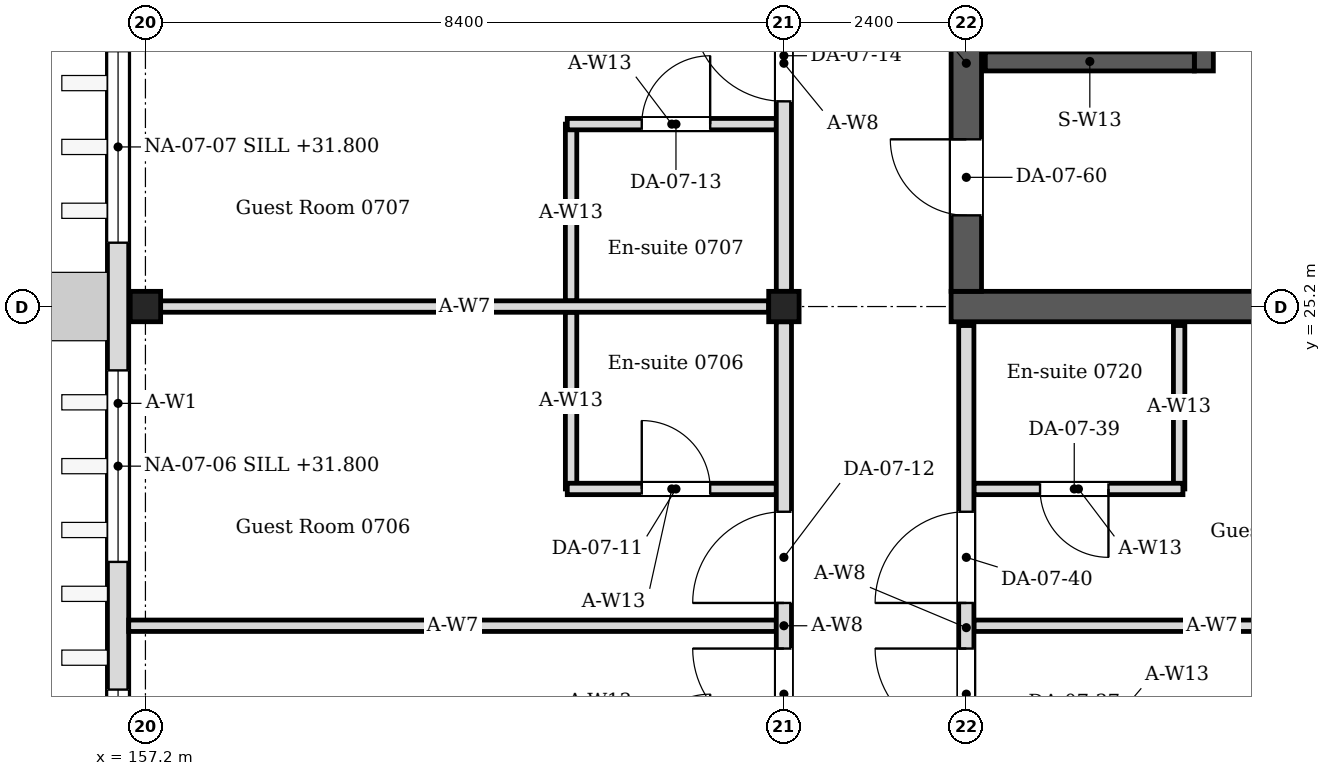
"""IFC4 building model, lengths in metres.
Left out: names, types, materials, properties, quantities, classifications, styles, units other than length and angle.
Written with IfcOpenShell. Run it as: python <this file> out.ifc"""

import sys

from ifc_helpers import new_model, si_unit, direction, frame, frame_2d, origin, origin_2d, place, context, subcontext, project, spatial, rectangle, i_section, extrude, element, fill, save


model = new_model("IFC4")
c1 = context("Model", 3, precision=1e-05, world=origin(), true_north=direction((0.0, 1.0)))
c2 = subcontext(c1, "Body", "Model", "MODEL_VIEW")
j1 = project(units=[si_unit("LENGTHUNIT", "METRE"), si_unit("PLANEANGLEUNIT", "RADIAN")], contexts=[c1])
p1 = place(None, origin())
s1 = spatial("IfcSite", under=j1, at=p1, CompositionType="ELEMENT")
p2 = place(p1, origin())
s2 = spatial("IfcBuilding", under=s1, at=p2, CompositionType="ELEMENT")
p3 = place(p2, frame((0.0, 0.0, 31.2)))
s3 = spatial("IfcBuildingStorey", under=s2, at=p3, CompositionType="ELEMENT", Elevation=31.2)
for number, where, z_axis, x_axis in (
    (1, (157.2, 25.2, 0.0), (0.0, 0.0, 1.0), (1.0, 0.0, 0.0)),
    (2, (165.6, 25.2, 0.0), (0.0, 0.0, 1.0), (1.0, 0.0, 0.0)),
):
    element("IfcColumn", number, at=place(p3, frame(where, z_axis=z_axis, x_axis=x_axis)), inside=s3, PredefinedType="COLUMN", context=c2, shape_type="SweptSolid", body=[
        extrude(i_section(OverallWidth=0.4, OverallDepth=0.4, WebThickness=0.013, FlangeThickness=0.021, FilletRadius=0.022, at=origin_2d()), origin(), (0.0, 0.0, 1.0), 4.2),
    ])
p4 = place(p3, frame((167.8, 25.2, 0.0), z_axis=(0.0, 0.0, 1.0), x_axis=(1.0, 0.0, 0.0)))
e3 = element("IfcWall", 3, at=p4, inside=s3, PredefinedType="SOLIDWALL", context=c2, shape_type="SweptSolid", body=[
    extrude(rectangle(XDim=8.8, YDim=0.4, at=frame_2d((4.4, 0.0))), origin(), (0.0, 0.0, 1.0), 4.05),
])
p5 = place(p3, frame((168.0, 25.4, 0.0), z_axis=(0.0, 0.0, 1.0), x_axis=(0.0, 1.0, 0.0)))
e4 = element("IfcWall", 4, at=p5, inside=s3, PredefinedType="SOLIDWALL", context=c2, shape_type="SweptSolid", body=[
    extrude(rectangle(XDim=16.4, YDim=0.4, at=frame_2d((8.2, 0.0))), origin(), (0.0, 0.0, 1.0), 4.05),
])
p6 = place(p5, frame((1.0, 0.0, 0.0)))
e5 = element("IfcOpeningElement", 5, at=p6, cuts=e4, PredefinedType="OPENING", context=c2, shape_type="SweptSolid", body=[
    extrude(rectangle(XDim=1.0, YDim=2.1, at=frame_2d((0.5, 1.05))), frame((0.0, 0.21, 0.0), z_axis=(0.0, -1.0, 0.0), x_axis=(1.0, 0.0, 0.0)), (0.0, 0.0, 1.0), 0.42),
])
p7 = place(p5, frame((14.4, 0.0, 0.0)))
e6 = element("IfcOpeningElement", 6, at=p7, cuts=e4, PredefinedType="OPENING", context=c2, shape_type="SweptSolid", body=[
    extrude(rectangle(XDim=1.4, YDim=2.1, at=frame_2d((0.7, 1.05))), frame((0.0, 0.21, 0.0), z_axis=(0.0, -1.0, 0.0), x_axis=(1.0, 0.0, 0.0)), (0.0, 0.0, 1.0), 0.42),
])
p8 = place(p3, frame((156.84, 16.45, 0.0), z_axis=(0.0, 0.0, 1.0), x_axis=(0.0, 1.0, 0.0)))
e7 = element("IfcWall", 7, at=p8, inside=s3, PredefinedType="SOLIDWALL", context=c2, shape_type="SweptSolid", body=[
    extrude(rectangle(XDim=25.9, YDim=0.28, at=frame_2d((12.95, 0.0))), origin(), (0.0, 0.0, 1.0), 4.05),
])
p9 = place(p8, frame((1.19, 0.0, 0.6)))
e8 = element("IfcOpeningElement", 8, at=p9, cuts=e7, PredefinedType="OPENING", context=c2, shape_type="SweptSolid", body=[
    extrude(rectangle(XDim=2.52, YDim=2.4, at=frame_2d((1.26, 1.2))), frame((0.0, 0.15, 0.0), z_axis=(0.0, -1.0, 0.0), x_axis=(1.0, 0.0, 0.0)), (0.0, 0.0, 1.0), 0.3),
])
p10 = place(p8, frame((5.39, 0.0, 0.6)))
e9 = element("IfcOpeningElement", 9, at=p10, cuts=e7, PredefinedType="OPENING", context=c2, shape_type="SweptSolid", body=[
    extrude(rectangle(XDim=2.52, YDim=2.4, at=frame_2d((1.26, 1.2))), frame((0.0, 0.15, 0.0), z_axis=(0.0, -1.0, 0.0), x_axis=(1.0, 0.0, 0.0)), (0.0, 0.0, 1.0), 0.3),
])
p11 = place(p8, frame((9.59, 0.0, 0.6)))
e10 = element("IfcOpeningElement", 10, at=p11, cuts=e7, PredefinedType="OPENING", context=c2, shape_type="SweptSolid", body=[
    extrude(rectangle(XDim=2.52, YDim=2.4, at=frame_2d((1.26, 1.2))), frame((0.0, 0.15, 0.0), z_axis=(0.0, -1.0, 0.0), x_axis=(1.0, 0.0, 0.0)), (0.0, 0.0, 1.0), 0.3),
])
p12 = place(p8, frame((13.79, 0.0, 0.6)))
e11 = element("IfcOpeningElement", 11, at=p12, cuts=e7, PredefinedType="OPENING", context=c2, shape_type="SweptSolid", body=[
    extrude(rectangle(XDim=2.52, YDim=2.4, at=frame_2d((1.26, 1.2))), frame((0.0, 0.15, 0.0), z_axis=(0.0, -1.0, 0.0), x_axis=(1.0, 0.0, 0.0)), (0.0, 0.0, 1.0), 0.3),
])
p13 = place(p8, frame((17.99, 0.0, 0.45)))
e12 = element("IfcOpeningElement", 12, at=p13, cuts=e7, PredefinedType="OPENING", context=c2, shape_type="SweptSolid", body=[
    extrude(rectangle(XDim=2.52, YDim=2.1, at=frame_2d((1.26, 1.05))), frame((0.0, 0.15, 0.0), z_axis=(0.0, -1.0, 0.0), x_axis=(1.0, 0.0, 0.0)), (0.0, 0.0, 1.0), 0.3),
])
p14 = place(p8, frame((22.19, 0.0, 0.6)))
e13 = element("IfcOpeningElement", 13, at=p14, cuts=e7, PredefinedType="OPENING", context=c2, shape_type="SweptSolid", body=[
    extrude(rectangle(XDim=2.52, YDim=2.4, at=frame_2d((1.26, 1.2))), frame((0.0, 0.15, 0.0), z_axis=(0.0, -1.0, 0.0), x_axis=(1.0, 0.0, 0.0)), (0.0, 0.0, 1.0), 0.3),
])
p15 = place(p3, frame((162.8, 22.8, 0.0), z_axis=(0.0, 0.0, 1.0), x_axis=(0.0, 1.0, 0.0)))
e14 = element("IfcWall", 14, at=p15, inside=s3, PredefinedType="PARTITIONING", context=c2, shape_type="SweptSolid", body=[
    extrude(rectangle(XDim=2.325, YDim=0.15, at=frame_2d((1.163, 0.0))), origin(), (0.0, 0.0, 1.0), 4.05),
])
p16 = place(p3, frame((162.75, 22.8, 0.0), z_axis=(0.0, 0.0, 1.0), x_axis=(1.0, 0.0, 0.0)))
e15 = element("IfcWall", 15, at=p16, inside=s3, PredefinedType="PARTITIONING", context=c2, shape_type="SweptSolid", body=[
    extrude(rectangle(XDim=2.75, YDim=0.15, at=frame_2d((1.375, 0.0))), origin(), (0.0, 0.0, 1.0), 4.05),
])
p17 = place(p16, frame((0.98, 0.0, 0.0)))
e16 = element("IfcOpeningElement", 16, at=p17, cuts=e15, PredefinedType="OPENING", context=c2, shape_type="SweptSolid", body=[
    extrude(rectangle(XDim=0.9, YDim=2.1, at=frame_2d((0.45, 1.05))), frame((0.0, 0.085, 0.0), z_axis=(0.0, -1.0, 0.0), x_axis=(1.0, 0.0, 0.0)), (0.0, 0.0, 1.0), 0.17),
])
p18 = place(p3, frame((162.8, 25.275, 0.0), z_axis=(0.0, 0.0, 1.0), x_axis=(0.0, 1.0, 0.0)))
e17 = element("IfcWall", 17, at=p18, inside=s3, PredefinedType="PARTITIONING", context=c2, shape_type="SweptSolid", body=[
    extrude(rectangle(XDim=2.325, YDim=0.15, at=frame_2d((1.163, 0.0))), origin(), (0.0, 0.0, 1.0), 4.05),
])
p19 = place(p3, frame((162.75, 27.6, 0.0), z_axis=(0.0, 0.0, 1.0), x_axis=(1.0, 0.0, 0.0)))
e18 = element("IfcWall", 18, at=p19, inside=s3, PredefinedType="PARTITIONING", context=c2, shape_type="SweptSolid", body=[
    extrude(rectangle(XDim=2.75, YDim=0.15, at=frame_2d((1.375, 0.0))), origin(), (0.0, 0.0, 1.0), 4.05),
])
p20 = place(p19, frame((0.98, 0.0, 0.0)))
e19 = element("IfcOpeningElement", 19, at=p20, cuts=e18, PredefinedType="OPENING", context=c2, shape_type="SweptSolid", body=[
    extrude(rectangle(XDim=0.9, YDim=2.1, at=frame_2d((0.45, 1.05))), frame((0.0, 0.085, 0.0), z_axis=(0.0, -1.0, 0.0), x_axis=(1.0, 0.0, 0.0)), (0.0, 0.0, 1.0), 0.17),
])
p21 = place(p3, frame((170.8, 22.8, 0.0), z_axis=(0.0, 0.0, 1.0), x_axis=(0.0, 1.0, 0.0)))
e20 = element("IfcWall", 20, at=p21, inside=s3, PredefinedType="PARTITIONING", context=c2, shape_type="SweptSolid", body=[
    extrude(rectangle(XDim=2.15, YDim=0.15, at=frame_2d((1.075, 0.0))), origin(), (0.0, 0.0, 1.0), 4.05),
])
p22 = place(p3, frame((170.85, 22.8, 0.0), z_axis=(0.0, 0.0, 1.0), x_axis=(-1.0, 0.0, 0.0)))
e21 = element("IfcWall", 21, at=p22, inside=s3, PredefinedType="PARTITIONING", context=c2, shape_type="SweptSolid", body=[
    extrude(rectangle(XDim=2.75, YDim=0.15, at=frame_2d((1.375, 0.0))), origin(), (0.0, 0.0, 1.0), 4.05),
])
p23 = place(p22, frame((0.98, 0.0, 0.0)))
e22 = element("IfcOpeningElement", 22, at=p23, cuts=e21, PredefinedType="OPENING", context=c2, shape_type="SweptSolid", body=[
    extrude(rectangle(XDim=0.9, YDim=2.1, at=frame_2d((0.45, 1.05))), frame((0.0, 0.085, 0.0), z_axis=(0.0, -1.0, 0.0), x_axis=(1.0, 0.0, 0.0)), (0.0, 0.0, 1.0), 0.17),
])
p24 = place(p3, frame((157.4, 25.2, 0.0), z_axis=(0.0, 0.0, 1.0), x_axis=(1.0, 0.0, 0.0)))
e23 = element("IfcWall", 23, at=p24, inside=s3, PredefinedType="PARTITIONING", context=c2, shape_type="SweptSolid", body=[
    extrude(rectangle(XDim=8.0, YDim=0.15, at=frame_2d((4.0, 0.0))), origin(), (0.0, 0.0, 1.0), 3.604),
])
p25 = place(p3, frame((156.98, 21.0, 0.0), z_axis=(0.0, 0.0, 1.0), x_axis=(1.0, 0.0, 0.0)))
e24 = element("IfcWall", 24, at=p25, inside=s3, PredefinedType="PARTITIONING", context=c2, shape_type="SweptSolid", body=[
    extrude(rectangle(XDim=8.52, YDim=0.15, at=frame_2d((4.26, 0.0))), origin(), (0.0, 0.0, 1.0), 3.604),
])
p26 = place(p3, frame((168.1, 21.0, 0.0), z_axis=(0.0, 0.0, 1.0), x_axis=(1.0, 0.0, 0.0)))
e25 = element("IfcWall", 25, at=p26, inside=s3, PredefinedType="PARTITIONING", context=c2, shape_type="SweptSolid", body=[
    extrude(rectangle(XDim=6.26, YDim=0.15, at=frame_2d((3.13, 0.0))), origin(), (0.0, 0.0, 1.0), 3.604),
])
p27 = place(p3, frame((165.6, 17.0, 0.0), z_axis=(0.0, 0.0, 1.0), x_axis=(0.0, 1.0, 0.0)))
e26 = element("IfcWall", 26, at=p27, inside=s3, PredefinedType="PARTITIONING", context=c2, shape_type="SweptSolid", body=[
    extrude(rectangle(XDim=8.0, YDim=0.2, at=frame_2d((4.0, 0.0))), origin(), (0.0, 0.0, 1.0), 3.45),
])
p28 = place(p27, frame((2.5, 0.0, 0.0)))
e27 = element("IfcOpeningElement", 27, at=p28, cuts=e26, PredefinedType="OPENING", context=c2, shape_type="SweptSolid", body=[
    extrude(rectangle(XDim=1.2, YDim=2.1, at=frame_2d((0.6, 1.05))), frame((0.0, 0.11, 0.0), z_axis=(0.0, -1.0, 0.0), x_axis=(1.0, 0.0, 0.0)), (0.0, 0.0, 1.0), 0.22),
])
p29 = place(p27, frame((4.3, 0.0, 0.0)))
e28 = element("IfcOpeningElement", 28, at=p29, cuts=e26, PredefinedType="OPENING", context=c2, shape_type="SweptSolid", body=[
    extrude(rectangle(XDim=1.2, YDim=2.1, at=frame_2d((0.6, 1.05))), frame((0.0, 0.11, 0.0), z_axis=(0.0, -1.0, 0.0), x_axis=(1.0, 0.0, 0.0)), (0.0, 0.0, 1.0), 0.22),
])
p30 = place(p3, frame((165.6, 25.4, 0.0), z_axis=(0.0, 0.0, 1.0), x_axis=(0.0, 1.0, 0.0)))
e29 = element("IfcWall", 29, at=p30, inside=s3, PredefinedType="PARTITIONING", context=c2, shape_type="SweptSolid", body=[
    extrude(rectangle(XDim=8.0, YDim=0.2, at=frame_2d((4.0, 0.0))), origin(), (0.0, 0.0, 1.0), 3.45),
])
p31 = place(p30, frame((2.5, 0.0, 0.0)))
e30 = element("IfcOpeningElement", 30, at=p31, cuts=e29, PredefinedType="OPENING", context=c2, shape_type="SweptSolid", body=[
    extrude(rectangle(XDim=1.2, YDim=2.1, at=frame_2d((0.6, 1.05))), frame((0.0, 0.11, 0.0), z_axis=(0.0, -1.0, 0.0), x_axis=(1.0, 0.0, 0.0)), (0.0, 0.0, 1.0), 0.22),
])
p32 = place(p30, frame((4.3, 0.0, 0.0)))
e31 = element("IfcOpeningElement", 31, at=p32, cuts=e29, PredefinedType="OPENING", context=c2, shape_type="SweptSolid", body=[
    extrude(rectangle(XDim=1.2, YDim=2.1, at=frame_2d((0.6, 1.05))), frame((0.0, 0.11, 0.0), z_axis=(0.0, -1.0, 0.0), x_axis=(1.0, 0.0, 0.0)), (0.0, 0.0, 1.0), 0.22),
])
p33 = place(p3, frame((168.0, 17.0, 0.0), z_axis=(0.0, 0.0, 1.0), x_axis=(0.0, 1.0, 0.0)))
e32 = element("IfcWall", 32, at=p33, inside=s3, PredefinedType="PARTITIONING", context=c2, shape_type="SweptSolid", body=[
    extrude(rectangle(XDim=7.95, YDim=0.2, at=frame_2d((3.975, 0.0))), origin(), (0.0, 0.0, 1.0), 3.45),
])
p34 = place(p33, frame((2.5, 0.0, 0.0)))
e33 = element("IfcOpeningElement", 33, at=p34, cuts=e32, PredefinedType="OPENING", context=c2, shape_type="SweptSolid", body=[
    extrude(rectangle(XDim=1.2, YDim=2.1, at=frame_2d((0.6, 1.05))), frame((0.0, 0.11, 0.0), z_axis=(0.0, -1.0, 0.0), x_axis=(1.0, 0.0, 0.0)), (0.0, 0.0, 1.0), 0.22),
])
p35 = place(p33, frame((4.3, 0.0, 0.0)))
e34 = element("IfcOpeningElement", 34, at=p35, cuts=e32, PredefinedType="OPENING", context=c2, shape_type="SweptSolid", body=[
    extrude(rectangle(XDim=1.2, YDim=2.1, at=frame_2d((0.6, 1.05))), frame((0.0, 0.11, 0.0), z_axis=(0.0, -1.0, 0.0), x_axis=(1.0, 0.0, 0.0)), (0.0, 0.0, 1.0), 0.22),
])
p36 = place(p3, frame((171.125, 28.3, 0.0), z_axis=(0.0, 0.0, 1.0), x_axis=(0.0, 1.0, 0.0)))
e35 = element("IfcWall", 35, at=p36, inside=s3, PredefinedType="SOLIDWALL", context=c2, shape_type="SweptSolid", body=[
    extrude(rectangle(XDim=10.9, YDim=0.25, at=frame_2d((5.45, 0.0))), origin(), (0.0, 0.0, 1.0), 4.05),
])
p37 = place(p36, frame((0.8, 0.0, 0.0)))
e36 = element("IfcOpeningElement", 36, at=p37, cuts=e35, PredefinedType="OPENING", context=c2, shape_type="SweptSolid", body=[
    extrude(rectangle(XDim=1.1, YDim=2.1, at=frame_2d((0.55, 1.05))), frame((0.0, 0.135, 0.0), z_axis=(0.0, -1.0, 0.0), x_axis=(1.0, 0.0, 0.0)), (0.0, 0.0, 1.0), 0.27),
])
p38 = place(p36, frame((3.05, 0.0, 0.0)))
e37 = element("IfcOpeningElement", 37, at=p38, cuts=e35, PredefinedType="OPENING", context=c2, shape_type="SweptSolid", body=[
    extrude(rectangle(XDim=1.1, YDim=2.1, at=frame_2d((0.55, 1.05))), frame((0.0, 0.135, 0.0), z_axis=(0.0, -1.0, 0.0), x_axis=(1.0, 0.0, 0.0)), (0.0, 0.0, 1.0), 0.27),
])
p39 = place(p36, frame((5.1, 0.0, 0.0)))
e38 = element("IfcOpeningElement", 38, at=p39, cuts=e35, PredefinedType="OPENING", context=c2, shape_type="SweptSolid", body=[
    extrude(rectangle(XDim=1.1, YDim=2.1, at=frame_2d((0.55, 1.05))), frame((0.0, 0.135, 0.0), z_axis=(0.0, -1.0, 0.0), x_axis=(1.0, 0.0, 0.0)), (0.0, 0.0, 1.0), 0.27),
])
p40 = place(p36, frame((7.15, 0.0, 0.0)))
e39 = element("IfcOpeningElement", 39, at=p40, cuts=e35, PredefinedType="OPENING", context=c2, shape_type="SweptSolid", body=[
    extrude(rectangle(XDim=1.1, YDim=2.1, at=frame_2d((0.55, 1.05))), frame((0.0, 0.135, 0.0), z_axis=(0.0, -1.0, 0.0), x_axis=(1.0, 0.0, 0.0)), (0.0, 0.0, 1.0), 0.27),
])
p41 = place(p36, frame((9.2, 0.0, 0.0)))
e40 = element("IfcOpeningElement", 40, at=p41, cuts=e35, PredefinedType="OPENING", context=c2, shape_type="SweptSolid", body=[
    extrude(rectangle(XDim=1.1, YDim=2.1, at=frame_2d((0.55, 1.05))), frame((0.0, 0.135, 0.0), z_axis=(0.0, -1.0, 0.0), x_axis=(1.0, 0.0, 0.0)), (0.0, 0.0, 1.0), 0.27),
])
p42 = place(p3, frame((168.25, 28.425, 0.0), z_axis=(0.0, 0.0, 1.0), x_axis=(1.0, 0.0, 0.0)))
e41 = element("IfcWall", 41, at=p42, inside=s3, PredefinedType="SOLIDWALL", context=c2, shape_type="SweptSolid", body=[
    extrude(rectangle(XDim=2.75, YDim=0.25, at=frame_2d((1.375, 0.0))), origin(), (0.0, 0.0, 1.0), 4.05),
])
p43 = place(p9, origin())
e42 = element("IfcWindow", 42, at=p43, inside=s3, PartitioningType="SINGLE_PANEL", PredefinedType="WINDOW", context=c2, shape_type="SweptSolid", body=[
    extrude(rectangle(XDim=2.52, YDim=2.4, at=frame_2d((1.26, 1.2))), frame((0.0, 0.03, 0.0), z_axis=(0.0, -1.0, 0.0), x_axis=(1.0, 0.0, 0.0)), (0.0, 0.0, 1.0), 0.06),
])
fill(e8, e42)
p44 = place(p10, origin())
e43 = element("IfcWindow", 43, at=p44, inside=s3, PartitioningType="SINGLE_PANEL", PredefinedType="WINDOW", context=c2, shape_type="SweptSolid", body=[
    extrude(rectangle(XDim=2.52, YDim=2.4, at=frame_2d((1.26, 1.2))), frame((0.0, 0.03, 0.0), z_axis=(0.0, -1.0, 0.0), x_axis=(1.0, 0.0, 0.0)), (0.0, 0.0, 1.0), 0.06),
])
fill(e9, e43)
p45 = place(p11, origin())
e44 = element("IfcWindow", 44, at=p45, inside=s3, PartitioningType="SINGLE_PANEL", PredefinedType="WINDOW", context=c2, shape_type="SweptSolid", body=[
    extrude(rectangle(XDim=2.52, YDim=2.4, at=frame_2d((1.26, 1.2))), frame((0.0, 0.03, 0.0), z_axis=(0.0, -1.0, 0.0), x_axis=(1.0, 0.0, 0.0)), (0.0, 0.0, 1.0), 0.06),
])
fill(e10, e44)
p46 = place(p28, origin())
e45 = element("IfcDoor", 45, at=p46, inside=s3, OperationType="SINGLE_SWING_RIGHT", PredefinedType="DOOR", context=c2, shape_type="SweptSolid", body=[
    extrude(rectangle(XDim=1.2, YDim=2.1, at=frame_2d((0.6, 1.05))), frame((0.0, 0.025, 0.0), z_axis=(0.0, -1.0, 0.0), x_axis=(1.0, 0.0, 0.0)), (0.0, 0.0, 1.0), 0.05),
])
fill(e27, e45)
p47 = place(p17, origin())
e46 = element("IfcDoor", 46, at=p47, inside=s3, OperationType="SINGLE_SWING_LEFT", PredefinedType="DOOR", context=c2, shape_type="SweptSolid", body=[
    extrude(rectangle(XDim=0.9, YDim=2.1, at=frame_2d((0.45, 1.05))), frame((0.0, 0.025, 0.0), z_axis=(0.0, -1.0, 0.0), x_axis=(1.0, 0.0, 0.0)), (0.0, 0.0, 1.0), 0.05),
])
fill(e16, e46)
p48 = place(p29, origin())
e47 = element("IfcDoor", 47, at=p48, inside=s3, OperationType="SINGLE_SWING_LEFT", PredefinedType="DOOR", context=c2, shape_type="SweptSolid", body=[
    extrude(rectangle(XDim=1.2, YDim=2.1, at=frame_2d((0.6, 1.05))), frame((0.0, 0.025, 0.0), z_axis=(0.0, -1.0, 0.0), x_axis=(1.0, 0.0, 0.0)), (0.0, 0.0, 1.0), 0.05),
])
fill(e28, e47)
p49 = place(p20, origin())
e48 = element("IfcDoor", 48, at=p49, inside=s3, OperationType="SINGLE_SWING_RIGHT", PredefinedType="DOOR", context=c2, shape_type="SweptSolid", body=[
    extrude(rectangle(XDim=0.9, YDim=2.1, at=frame_2d((0.45, 1.05))), frame((0.0, 0.025, 0.0), z_axis=(0.0, -1.0, 0.0), x_axis=(1.0, 0.0, 0.0)), (0.0, 0.0, 1.0), 0.05),
])
fill(e19, e48)
p50 = place(p31, origin())
e49 = element("IfcDoor", 49, at=p50, inside=s3, OperationType="SINGLE_SWING_RIGHT", PredefinedType="DOOR", context=c2, shape_type="SweptSolid", body=[
    extrude(rectangle(XDim=1.2, YDim=2.1, at=frame_2d((0.6, 1.05))), frame((0.0, 0.025, 0.0), z_axis=(0.0, -1.0, 0.0), x_axis=(1.0, 0.0, 0.0)), (0.0, 0.0, 1.0), 0.05),
])
fill(e30, e49)
p51 = place(p34, origin())
e50 = element("IfcDoor", 50, at=p51, inside=s3, OperationType="SINGLE_SWING_RIGHT", PredefinedType="DOOR", context=c2, shape_type="SweptSolid", body=[
    extrude(rectangle(XDim=1.2, YDim=2.1, at=frame_2d((0.6, 1.05))), frame((0.0, 0.025, 0.0), z_axis=(0.0, -1.0, 0.0), x_axis=(1.0, 0.0, 0.0)), (0.0, 0.0, 1.0), 0.05),
])
fill(e33, e50)
p52 = place(p23, origin())
e51 = element("IfcDoor", 51, at=p52, inside=s3, OperationType="SINGLE_SWING_LEFT", PredefinedType="DOOR", context=c2, shape_type="SweptSolid", body=[
    extrude(rectangle(XDim=0.9, YDim=2.1, at=frame_2d((0.45, 1.05))), frame((0.0, 0.025, 0.0), z_axis=(0.0, -1.0, 0.0), x_axis=(1.0, 0.0, 0.0)), (0.0, 0.0, 1.0), 0.05),
])
fill(e22, e51)
p53 = place(p35, origin())
e52 = element("IfcDoor", 52, at=p53, inside=s3, OperationType="SINGLE_SWING_LEFT", PredefinedType="DOOR", context=c2, shape_type="SweptSolid", body=[
    extrude(rectangle(XDim=1.2, YDim=2.1, at=frame_2d((0.6, 1.05))), frame((0.0, 0.025, 0.0), z_axis=(0.0, -1.0, 0.0), x_axis=(1.0, 0.0, 0.0)), (0.0, 0.0, 1.0), 0.05),
])
fill(e34, e52)
p54 = place(p6, origin())
e53 = element("IfcDoor", 53, at=p54, inside=s3, OperationType="SINGLE_SWING_RIGHT", PredefinedType="DOOR", context=c2, shape_type="SweptSolid", body=[
    extrude(rectangle(XDim=1.0, YDim=2.1, at=frame_2d((0.5, 1.05))), frame((0.0, 0.025, 0.0), z_axis=(0.0, -1.0, 0.0), x_axis=(1.0, 0.0, 0.0)), (0.0, 0.0, 1.0), 0.05),
])
fill(e5, e53)
save(model, sys.argv[1])
